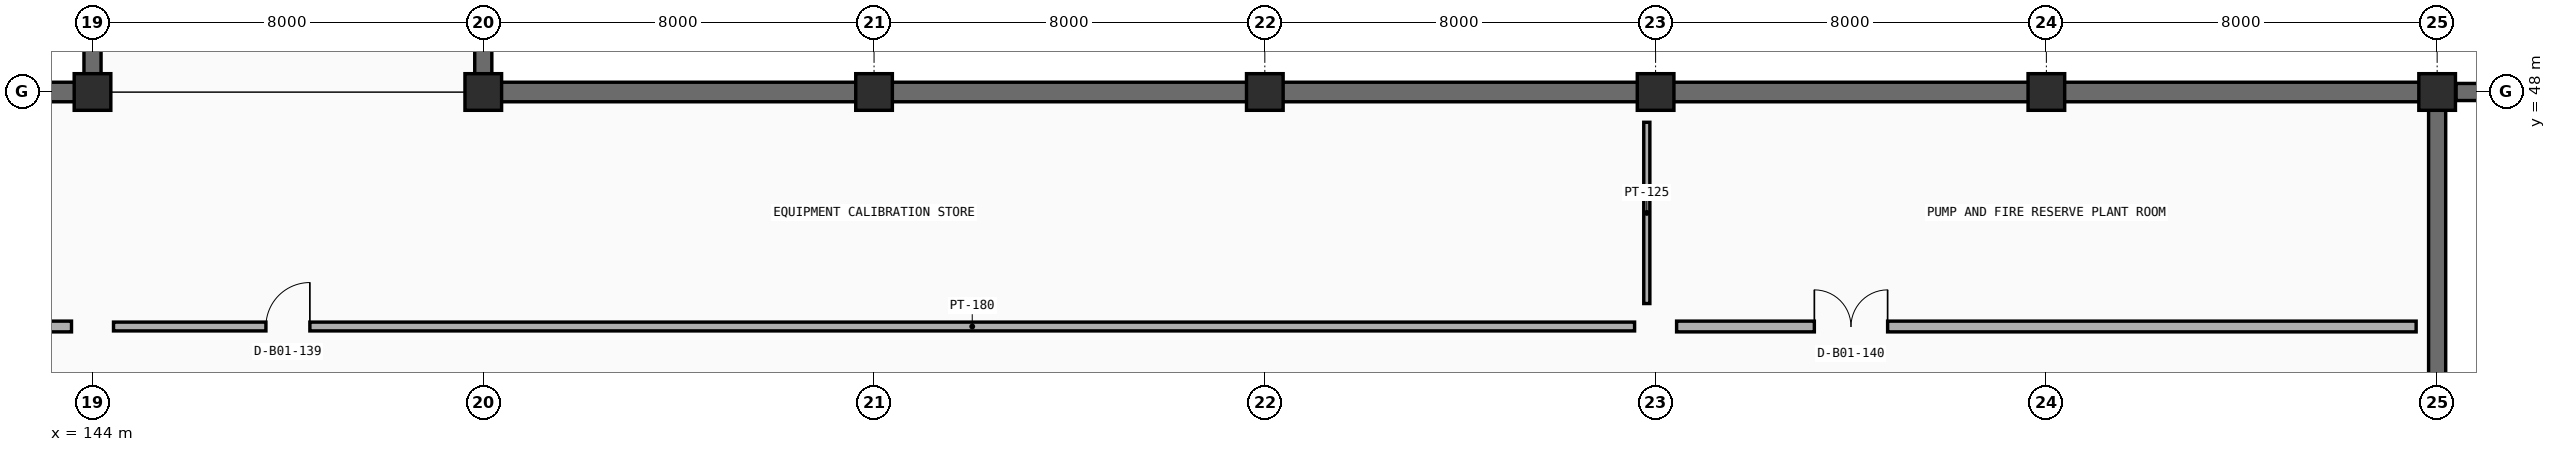
"""IFC4 building model, lengths in metres.
Left out: names, types, materials, properties, quantities, classifications, styles, units other than length and angle.
Written with IfcOpenShell. Run it as: python <this file> out.ifc"""

import sys

from ifc_helpers import new_model, si_unit, direction, frame, frame_2d, origin, origin_2d, place, context, subcontext, project, spatial, rectangle, extrude, element, fill, save


model = new_model("IFC4")
c1 = context("Model", 3, precision=1e-05, world=origin(), true_north=direction((0.0, 1.0)))
c2 = subcontext(c1, "Body", "Model", "MODEL_VIEW")
j1 = project(units=[si_unit("LENGTHUNIT", "METRE"), si_unit("PLANEANGLEUNIT", "RADIAN")], contexts=[c1])
p1 = place(None, origin())
s1 = spatial("IfcSite", under=j1, at=p1, CompositionType="ELEMENT")
p2 = place(p1, origin())
s2 = spatial("IfcBuilding", under=s1, at=p2, CompositionType="ELEMENT")
p3 = place(p2, frame((0.0, 0.0, -4.5)))
s3 = spatial("IfcBuildingStorey", under=s2, at=p3, CompositionType="ELEMENT", Elevation=-4.5)
for number, where, z_axis, x_axis in (
    (1, (144.0, 48.0, -0.405), (0.0, 0.0, 1.0), (1.0, 0.0, 0.0)),
    (2, (152.0, 48.0, -0.405), (0.0, 0.0, 1.0), (1.0, 0.0, 0.0)),
    (3, (160.0, 48.0, -0.405), (0.0, 0.0, 1.0), (1.0, 0.0, 0.0)),
    (4, (168.0, 48.0, -0.405), (0.0, 0.0, 1.0), (1.0, 0.0, 0.0)),
    (5, (176.0, 48.0, -0.405), (0.0, 0.0, 1.0), (1.0, 0.0, 0.0)),
    (6, (184.0, 48.0, -0.405), (0.0, 0.0, 1.0), (1.0, 0.0, 0.0)),
    (7, (192.0, 48.0, -0.405), (0.0, 0.0, 1.0), (1.0, 0.0, 0.0)),
):
    element("IfcColumn", number, at=place(p3, frame(where, z_axis=z_axis, x_axis=x_axis)), inside=s3, PredefinedType="COLUMN", context=c2, shape_type="SweptSolid", body=[
        extrude(rectangle(XDim=0.75, YDim=0.75, at=origin_2d()), origin(), (0.0, 0.0, 1.0), 4.905),
    ])
for number, where, z_axis, x_axis in (
    (8, (136.35, 48.0, 0.0), (0.0, 0.0, 1.0), (1.0, 0.0, 0.0)),
    (9, (152.35, 48.0, 0.0), (0.0, 0.0, 1.0), (1.0, 0.0, 0.0)),
    (10, (160.35, 48.0, 0.0), (0.0, 0.0, 1.0), (1.0, 0.0, 0.0)),
    (11, (168.35, 48.0, 0.0), (0.0, 0.0, 1.0), (1.0, 0.0, 0.0)),
    (12, (176.35, 48.0, 0.0), (0.0, 0.0, 1.0), (1.0, 0.0, 0.0)),
    (13, (184.35, 48.0, 0.0), (0.0, 0.0, 1.0), (1.0, 0.0, 0.0)),
):
    element("IfcWall", number, at=place(p3, frame(where, z_axis=z_axis, x_axis=x_axis)), inside=s3, PredefinedType="USERDEFINED", context=c2, shape_type="SweptSolid", body=[
        extrude(rectangle(XDim=7.3, YDim=0.4, at=frame_2d((3.65, 0.0))), origin(), (0.0, 0.0, 1.0), 4.095),
    ])
for number, where, z_axis, x_axis in (
    (14, (192.0, 47.65, 0.0), (0.0, 0.0, 1.0), (0.0, -1.0, 0.0)),
    (15, (144.0, 48.35, 0.0), (0.0, 0.0, 1.0), (0.0, 1.0, 0.0)),
    (16, (152.0, 55.65, 0.0), (0.0, 0.0, 1.0), (0.0, -1.0, 0.0)),
):
    element("IfcWall", number, at=place(p3, frame(where, z_axis=z_axis, x_axis=x_axis)), inside=s3, PredefinedType="USERDEFINED", context=c2, shape_type="SweptSolid", body=[
        extrude(rectangle(XDim=7.3, YDim=0.35, at=frame_2d((3.65, 0.0))), origin(), (0.0, 0.0, 1.0), 4.095),
    ])
p4 = place(p3, frame((192.387, 48.0, -0.405), z_axis=(0.0, 0.0, 1.0), x_axis=(1.0, 0.0, 0.0)))
e17 = element("IfcWall", 17, at=p4, inside=s3, PredefinedType="USERDEFINED", context=c2, shape_type="SweptSolid", body=[
    extrude(rectangle(XDim=7.226, YDim=0.35, at=frame_2d((3.613, 0.0))), origin(), (0.0, 0.0, 1.0), 4.495),
])
p5 = place(p3, frame((112.43, 43.2, 0.0), z_axis=(0.0, 0.0, 1.0), x_axis=(1.0, 0.0, 0.0)))
e18 = element("IfcWall", 18, at=p5, inside=s3, PredefinedType="PARTITIONING", context=c2, shape_type="SweptSolid", body=[
    extrude(rectangle(XDim=31.14, YDim=0.22, at=frame_2d((15.57, 0.0))), origin(), (0.0, 0.0, 1.0), 3.6),
])
p6 = place(p5, frame((2.82, 0.0, 0.0)))
e19 = element("IfcOpeningElement", 19, at=p6, cuts=e18, PredefinedType="OPENING", context=c2, shape_type="SweptSolid", body=[
    extrude(rectangle(XDim=1.5, YDim=2.2, at=frame_2d((0.75, 1.1))), frame((0.0, 0.12, 0.0), z_axis=(0.0, -1.0, 0.0), x_axis=(1.0, 0.0, 0.0)), (0.0, 0.0, 1.0), 0.24),
])
p7 = place(p3, frame((144.43, 43.2, 0.0), z_axis=(0.0, 0.0, 1.0), x_axis=(1.0, 0.0, 0.0)))
e20 = element("IfcWall", 20, at=p7, inside=s3, PredefinedType="PARTITIONING", context=c2, shape_type="SweptSolid", body=[
    extrude(rectangle(XDim=31.14, YDim=0.18, at=frame_2d((15.57, 0.0))), origin(), (0.0, 0.0, 1.0), 3.6),
])
p8 = place(p7, frame((3.12, 0.0, 0.0)))
e21 = element("IfcOpeningElement", 21, at=p8, cuts=e20, PredefinedType="OPENING", context=c2, shape_type="SweptSolid", body=[
    extrude(rectangle(XDim=0.9, YDim=2.1, at=frame_2d((0.45, 1.05))), frame((0.0, 0.1, 0.0), z_axis=(0.0, -1.0, 0.0), x_axis=(1.0, 0.0, 0.0)), (0.0, 0.0, 1.0), 0.2),
])
p9 = place(p3, frame((175.82, 43.67, 0.0), z_axis=(0.0, 0.0, 1.0), x_axis=(0.0, 1.0, 0.0)))
e22 = element("IfcWall", 22, at=p9, inside=s3, PredefinedType="PARTITIONING", context=c2, shape_type="SweptSolid", body=[
    extrude(rectangle(XDim=3.71, YDim=0.125, at=frame_2d((1.855, 0.0))), origin(), (0.0, 0.0, 1.0), 3.27),
])
p10 = place(p3, frame((176.43, 43.2, 0.0), z_axis=(0.0, 0.0, 1.0), x_axis=(1.0, 0.0, 0.0)))
e23 = element("IfcWall", 23, at=p10, inside=s3, PredefinedType="PARTITIONING", context=c2, shape_type="SweptSolid", body=[
    extrude(rectangle(XDim=15.14, YDim=0.22, at=frame_2d((7.57, 0.0))), origin(), (0.0, 0.0, 1.0), 3.6),
])
p11 = place(p10, frame((2.82, 0.0, 0.0)))
e24 = element("IfcOpeningElement", 24, at=p11, cuts=e23, PredefinedType="OPENING", context=c2, shape_type="SweptSolid", body=[
    extrude(rectangle(XDim=1.5, YDim=2.2, at=frame_2d((0.75, 1.1))), frame((0.0, 0.12, 0.0), z_axis=(0.0, -1.0, 0.0), x_axis=(1.0, 0.0, 0.0)), (0.0, 0.0, 1.0), 0.24),
])
p12 = place(p8, origin())
e25 = element("IfcDoor", 25, at=p12, inside=s3, OperationType="SINGLE_SWING_RIGHT", PredefinedType="DOOR", context=c2, shape_type="SweptSolid", body=[
    extrude(rectangle(XDim=0.9, YDim=2.1, at=frame_2d((0.45, 1.05))), frame((0.0, 0.025, 0.0), z_axis=(0.0, -1.0, 0.0), x_axis=(1.0, 0.0, 0.0)), (0.0, 0.0, 1.0), 0.05),
])
fill(e21, e25)
p13 = place(p11, origin())
e26 = element("IfcDoor", 26, at=p13, inside=s3, OperationType="DOUBLE_DOOR_SINGLE_SWING", PredefinedType="DOOR", context=c2, shape_type="SweptSolid", body=[
    extrude(rectangle(XDim=1.5, YDim=2.2, at=frame_2d((0.75, 1.1))), frame((0.0, 0.025, 0.0), z_axis=(0.0, -1.0, 0.0), x_axis=(1.0, 0.0, 0.0)), (0.0, 0.0, 1.0), 0.05),
])
fill(e24, e26)
save(model, sys.argv[1])
